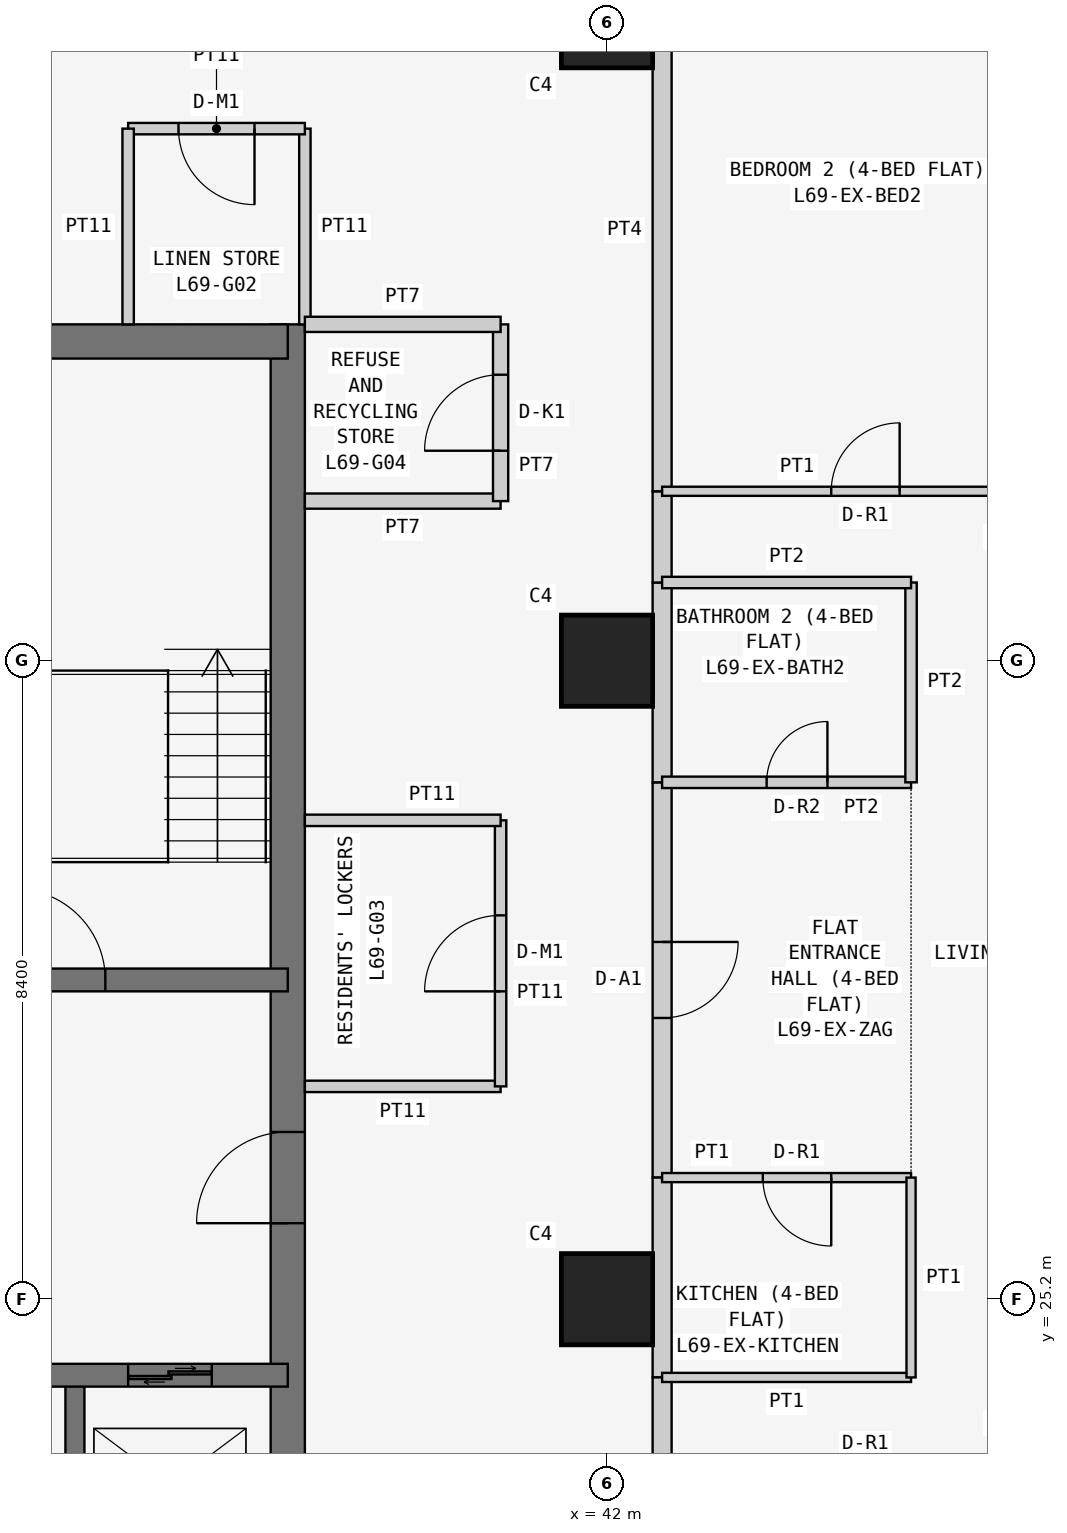
"""IFC4 building model, lengths in metres.
Left out: names, types, materials, properties, quantities, classifications, styles, units other than length and angle.
Written with IfcOpenShell. Run it as: python <this file> out.ifc"""

import sys

from ifc_helpers import new_model, si_unit, direction, frame, frame_2d, origin, origin_2d, place, context, subcontext, project, spatial, rectangle, extrude, element, fill, save


model = new_model("IFC4")
c1 = context("Model", 3, precision=1e-05, world=origin(), true_north=direction((0.0, 1.0)))
c2 = subcontext(c1, "Body", "Model", "MODEL_VIEW")
j1 = project(units=[si_unit("LENGTHUNIT", "METRE"), si_unit("PLANEANGLEUNIT", "RADIAN")], contexts=[c1])
p1 = place(None, origin())
s1 = spatial("IfcSite", under=j1, at=p1, CompositionType="ELEMENT")
p2 = place(p1, origin())
s2 = spatial("IfcBuilding", under=s1, at=p2, CompositionType="ELEMENT")
p3 = place(p2, frame((0.0, 0.0, 264.9)))
s3 = spatial("IfcBuildingStorey", under=s2, at=p3, CompositionType="ELEMENT", Elevation=264.9)
for number, where, z_axis, x_axis in (
    (1, (42.0, 25.2, 0.0), (0.0, 0.0, 1.0), (1.0, 0.0, 0.0)),
    (2, (42.0, 33.6, 0.0), (0.0, 0.0, 1.0), (1.0, 0.0, 0.0)),
    (3, (42.0, 42.0, 0.0), (0.0, 0.0, 1.0), (1.0, 0.0, 0.0)),
):
    element("IfcColumn", number, at=place(p3, frame(where, z_axis=z_axis, x_axis=x_axis)), inside=s3, PredefinedType="COLUMN", context=c2, shape_type="SweptSolid", body=[
        extrude(rectangle(XDim=1.2, YDim=1.2, at=origin_2d()), origin(), (0.0, 0.0, 1.0), 3.6),
    ])
p4 = place(p3, frame((37.8, 21.0, 0.0), z_axis=(0.0, 0.0, 1.0), x_axis=(0.0, 1.0, 0.0)))
e4 = element("IfcWall", 4, at=p4, inside=s3, PredefinedType="SHEAR", context=c2, shape_type="SweptSolid", body=[
    extrude(rectangle(XDim=17.025, YDim=0.45, at=frame_2d((8.512, 0.0))), origin(), (0.0, 0.0, 1.0), 3.6),
])
p5 = place(p4, frame((5.2, 0.0, 0.0)))
e5 = element("IfcOpeningElement", 5, at=p5, cuts=e4, PredefinedType="OPENING", context=c2, shape_type="SweptSolid", body=[
    extrude(rectangle(XDim=1.2, YDim=2.1, at=frame_2d((0.6, 1.05))), frame((0.0, 0.235, 0.0), z_axis=(0.0, -1.0, 0.0), x_axis=(1.0, 0.0, 0.0)), (0.0, 0.0, 1.0), 0.47),
])
p6 = place(p3, frame((37.8, 37.8, 0.0), z_axis=(0.0, 0.0, 1.0), x_axis=(-1.0, 0.0, 0.0)))
e6 = element("IfcWall", 6, at=p6, inside=s3, PredefinedType="SHEAR", context=c2, shape_type="SweptSolid", body=[
    extrude(rectangle(XDim=17.025, YDim=0.45, at=frame_2d((8.513, 0.0))), origin(), (0.0, 0.0, 1.0), 3.6),
])
p7 = place(p3, frame((26.6, 24.2, 0.0), z_axis=(0.0, 0.0, 1.0), x_axis=(1.0, 0.0, 0.0)))
e7 = element("IfcWall", 7, at=p7, inside=s3, PredefinedType="SHEAR", context=c2, shape_type="SweptSolid", body=[
    extrude(rectangle(XDim=11.2, YDim=0.3, at=frame_2d((5.6, 0.0))), origin(), (0.0, 0.0, 1.0), 3.6),
])
p8 = place(p7, frame((0.913, 0.0, 0.0)))
e8 = element("IfcOpeningElement", 8, at=p8, cuts=e7, PredefinedType="OPENING", context=c2, shape_type="SweptSolid", body=[
    extrude(rectangle(XDim=1.0, YDim=2.1, at=frame_2d((0.5, 1.05))), frame((0.0, 0.16, 0.0), z_axis=(0.0, -1.0, 0.0), x_axis=(1.0, 0.0, 0.0)), (0.0, 0.0, 1.0), 0.32),
])
p9 = place(p7, frame((3.7, 0.0, 0.0)))
e9 = element("IfcOpeningElement", 9, at=p9, cuts=e7, PredefinedType="OPENING", context=c2, shape_type="SweptSolid", body=[
    extrude(rectangle(XDim=1.0, YDim=2.1, at=frame_2d((0.5, 1.05))), frame((0.0, 0.16, 0.0), z_axis=(0.0, -1.0, 0.0), x_axis=(1.0, 0.0, 0.0)), (0.0, 0.0, 1.0), 0.32),
])
p10 = place(p7, frame((6.5, 0.0, 0.0)))
e10 = element("IfcOpeningElement", 10, at=p10, cuts=e7, PredefinedType="OPENING", context=c2, shape_type="SweptSolid", body=[
    extrude(rectangle(XDim=1.0, YDim=2.1, at=frame_2d((0.5, 1.05))), frame((0.0, 0.16, 0.0), z_axis=(0.0, -1.0, 0.0), x_axis=(1.0, 0.0, 0.0)), (0.0, 0.0, 1.0), 0.32),
])
p11 = place(p7, frame((9.1, 0.0, 0.0)))
e11 = element("IfcOpeningElement", 11, at=p11, cuts=e7, PredefinedType="OPENING", context=c2, shape_type="SweptSolid", body=[
    extrude(rectangle(XDim=1.1, YDim=2.1, at=frame_2d((0.55, 1.05))), frame((0.0, 0.16, 0.0), z_axis=(0.0, -1.0, 0.0), x_axis=(1.0, 0.0, 0.0)), (0.0, 0.0, 1.0), 0.32),
])
p12 = place(p3, frame((32.2, 29.4, 0.0), z_axis=(0.0, 0.0, 1.0), x_axis=(1.0, 0.0, 0.0)))
e12 = element("IfcWall", 12, at=p12, inside=s3, PredefinedType="SHEAR", context=c2, shape_type="SweptSolid", body=[
    extrude(rectangle(XDim=5.6, YDim=0.3, at=frame_2d((2.8, 0.0))), origin(), (0.0, 0.0, 1.0), 3.6),
])
p13 = place(p12, frame((2.0, 0.0, 0.0)))
e13 = element("IfcOpeningElement", 13, at=p13, cuts=e12, PredefinedType="OPENING", context=c2, shape_type="SweptSolid", body=[
    extrude(rectangle(XDim=1.2, YDim=2.1, at=frame_2d((0.6, 1.05))), frame((0.0, 0.16, 0.0), z_axis=(0.0, -1.0, 0.0), x_axis=(1.0, 0.0, 0.0)), (0.0, 0.0, 1.0), 0.32),
])
p14 = place(p3, frame((35.0, 21.0, 0.0), z_axis=(0.0, 0.0, 1.0), x_axis=(0.0, 1.0, 0.0)))
e14 = element("IfcWall", 14, at=p14, inside=s3, PredefinedType="SHEAR", context=c2, shape_type="SweptSolid", body=[
    extrude(rectangle(XDim=3.2, YDim=0.25, at=frame_2d((1.6, 0.0))), origin(), (0.0, 0.0, 1.0), 3.6),
])
p15 = place(p3, frame((38.025, 38.025, 0.0), z_axis=(0.0, 0.0, 1.0), x_axis=(0.0, 1.0, 0.0)))
e15 = element("IfcWall", 15, at=p15, inside=s3, PredefinedType="PARTITIONING", context=c2, shape_type="SweptSolid", body=[
    extrude(rectangle(XDim=2.575, YDim=0.15, at=frame_2d((1.288, 0.0))), origin(), (0.0, 0.0, 1.0), 3.45),
])
p16 = place(p3, frame((38.025, 40.6, 0.0), z_axis=(0.0, 0.0, 1.0), x_axis=(-1.0, 0.0, 0.0)))
e16 = element("IfcWall", 16, at=p16, inside=s3, PredefinedType="PARTITIONING", context=c2, shape_type="SweptSolid", body=[
    extrude(rectangle(XDim=2.325, YDim=0.15, at=frame_2d((1.163, 0.0))), origin(), (0.0, 0.0, 1.0), 3.45),
])
p17 = place(p16, frame((0.663, 0.0, 0.0)))
e17 = element("IfcOpeningElement", 17, at=p17, cuts=e16, PredefinedType="OPENING", context=c2, shape_type="SweptSolid", body=[
    extrude(rectangle(XDim=1.0, YDim=2.1, at=frame_2d((0.5, 1.05))), frame((0.0, 0.085, 0.0), z_axis=(0.0, -1.0, 0.0), x_axis=(1.0, 0.0, 0.0)), (0.0, 0.0, 1.0), 0.17),
])
for number, where, z_axis, x_axis in (
    (18, (35.7, 40.6, 0.0), (0.0, 0.0, 1.0), (0.0, -1.0, 0.0)),
    (19, (38.025, 28.0, 0.0), (0.0, 0.0, 1.0), (1.0, 0.0, 0.0)),
):
    element("IfcWall", number, at=place(p3, frame(where, z_axis=z_axis, x_axis=x_axis)), inside=s3, PredefinedType="PARTITIONING", context=c2, shape_type="SweptSolid", body=[
        extrude(rectangle(XDim=2.575, YDim=0.15, at=frame_2d((1.288, 0.0))), origin(), (0.0, 0.0, 1.0), 3.45),
    ])
p18 = place(p3, frame((40.6, 28.0, 0.0), z_axis=(0.0, 0.0, 1.0), x_axis=(0.0, 1.0, 0.0)))
e20 = element("IfcWall", 20, at=p18, inside=s3, PredefinedType="PARTITIONING", context=c2, shape_type="SweptSolid", body=[
    extrude(rectangle(XDim=3.5, YDim=0.15, at=frame_2d((1.75, 0.0))), origin(), (0.0, 0.0, 1.0), 3.45),
])
p19 = place(p18, frame((1.25, 0.0, 0.0)))
e21 = element("IfcOpeningElement", 21, at=p19, cuts=e20, PredefinedType="OPENING", context=c2, shape_type="SweptSolid", body=[
    extrude(rectangle(XDim=1.0, YDim=2.1, at=frame_2d((0.5, 1.05))), frame((0.0, 0.085, 0.0), z_axis=(0.0, -1.0, 0.0), x_axis=(1.0, 0.0, 0.0)), (0.0, 0.0, 1.0), 0.17),
])
p20 = place(p3, frame((40.6, 31.5, 0.0), z_axis=(0.0, 0.0, 1.0), x_axis=(-1.0, 0.0, 0.0)))
e22 = element("IfcWall", 22, at=p20, inside=s3, PredefinedType="PARTITIONING", context=c2, shape_type="SweptSolid", body=[
    extrude(rectangle(XDim=2.575, YDim=0.15, at=frame_2d((1.288, 0.0))), origin(), (0.0, 0.0, 1.0), 3.45),
])
p21 = place(p3, frame((38.025, 35.7, 0.0), z_axis=(0.0, 0.0, 1.0), x_axis=(1.0, 0.0, 0.0)))
e23 = element("IfcWall", 23, at=p21, inside=s3, PredefinedType="PARTITIONING", context=c2, shape_type="SweptSolid", body=[
    extrude(rectangle(XDim=2.575, YDim=0.2, at=frame_2d((1.288, 0.0))), origin(), (0.0, 0.0, 1.0), 3.45),
])
p22 = place(p3, frame((40.6, 35.7, 0.0), z_axis=(0.0, 0.0, 1.0), x_axis=(0.0, 1.0, 0.0)))
e24 = element("IfcWall", 24, at=p22, inside=s3, PredefinedType="PARTITIONING", context=c2, shape_type="SweptSolid", body=[
    extrude(rectangle(XDim=2.325, YDim=0.2, at=frame_2d((1.163, 0.0))), origin(), (0.0, 0.0, 1.0), 3.45),
])
p23 = place(p22, frame((0.663, 0.0, 0.0)))
e25 = element("IfcOpeningElement", 25, at=p23, cuts=e24, PredefinedType="OPENING", context=c2, shape_type="SweptSolid", body=[
    extrude(rectangle(XDim=1.0, YDim=2.1, at=frame_2d((0.5, 1.05))), frame((0.0, 0.11, 0.0), z_axis=(0.0, -1.0, 0.0), x_axis=(1.0, 0.0, 0.0)), (0.0, 0.0, 1.0), 0.22),
])
p24 = place(p3, frame((40.6, 38.025, 0.0), z_axis=(0.0, 0.0, 1.0), x_axis=(-1.0, 0.0, 0.0)))
e26 = element("IfcWall", 26, at=p24, inside=s3, PredefinedType="PARTITIONING", context=c2, shape_type="SweptSolid", body=[
    extrude(rectangle(XDim=2.575, YDim=0.2, at=frame_2d((1.288, 0.0))), origin(), (0.0, 0.0, 1.0), 3.45),
])
p25 = place(p3, frame((42.725, 32.0, 0.0), z_axis=(0.0, 0.0, 1.0), x_axis=(0.0, -1.0, 0.0)))
e27 = element("IfcWall", 27, at=p25, inside=s3, PredefinedType="PARTITIONING", context=c2, shape_type="SweptSolid", body=[
    extrude(rectangle(XDim=5.2, YDim=0.25, at=frame_2d((2.6, 0.0))), origin(), (0.0, 0.0, 1.0), 3.45),
])
p26 = place(p25, frame((2.1, 0.0, 0.0)))
e28 = element("IfcOpeningElement", 28, at=p26, cuts=e27, PredefinedType="OPENING", context=c2, shape_type="SweptSolid", body=[
    extrude(rectangle(XDim=1.0, YDim=2.1, at=frame_2d((0.5, 1.05))), frame((0.0, 0.135, 0.0), z_axis=(0.0, -1.0, 0.0), x_axis=(1.0, 0.0, 0.0)), (0.0, 0.0, 1.0), 0.27),
])
p27 = place(p3, frame((42.725, 34.629, 0.0), z_axis=(0.0, 0.0, 1.0), x_axis=(0.0, -1.0, 0.0)))
e29 = element("IfcWall", 29, at=p27, inside=s3, PredefinedType="PARTITIONING", context=c2, shape_type="SweptSolid", body=[
    extrude(rectangle(XDim=2.629, YDim=0.25, at=frame_2d((1.314, 0.0))), origin(), (0.0, 0.0, 1.0), 3.45),
])
p28 = place(p3, frame((42.725, 26.8, 0.0), z_axis=(0.0, 0.0, 1.0), x_axis=(0.0, -1.0, 0.0)))
e30 = element("IfcWall", 30, at=p28, inside=s3, PredefinedType="PARTITIONING", context=c2, shape_type="SweptSolid", body=[
    extrude(rectangle(XDim=2.629, YDim=0.25, at=frame_2d((1.314, 0.0))), origin(), (0.0, 0.0, 1.0), 3.45),
])
p29 = place(p3, frame((42.725, 24.171, 0.0), z_axis=(0.0, 0.0, 1.0), x_axis=(0.0, -1.0, 0.0)))
e31 = element("IfcWall", 31, at=p29, inside=s3, PredefinedType="PARTITIONING", context=c2, shape_type="SweptSolid", body=[
    extrude(rectangle(XDim=1.2, YDim=0.25, at=frame_2d((0.6, 0.0))), origin(), (0.0, 0.0, 1.0), 3.45),
])
p30 = place(p3, frame((42.725, 35.829, 0.0), z_axis=(0.0, 0.0, 1.0), x_axis=(0.0, -1.0, 0.0)))
e32 = element("IfcWall", 32, at=p30, inside=s3, PredefinedType="PARTITIONING", context=c2, shape_type="SweptSolid", body=[
    extrude(rectangle(XDim=1.2, YDim=0.25, at=frame_2d((0.6, 0.0))), origin(), (0.0, 0.0, 1.0), 3.45),
])
p31 = place(p3, frame((42.725, 42.7, 0.0), z_axis=(0.0, 0.0, 1.0), x_axis=(0.0, -1.0, 0.0)))
e33 = element("IfcWall", 33, at=p31, inside=s3, PredefinedType="PARTITIONING", context=c2, shape_type="SweptSolid", body=[
    extrude(rectangle(XDim=6.871, YDim=0.25, at=frame_2d((3.436, 0.0))), origin(), (0.0, 0.0, 1.0), 3.45),
])
p32 = place(p3, frame((46.0, 32.0, 0.0), z_axis=(0.0, 0.0, 1.0), x_axis=(-1.0, 0.0, 0.0)))
e34 = element("IfcWall", 34, at=p32, inside=s3, PredefinedType="PARTITIONING", context=c2, shape_type="SweptSolid", body=[
    extrude(rectangle(XDim=3.275, YDim=0.15, at=frame_2d((1.637, 0.0))), origin(), (0.0, 0.0, 1.0), 3.45),
])
p33 = place(p32, frame((1.1, 0.0, 0.0)))
e35 = element("IfcOpeningElement", 35, at=p33, cuts=e34, PredefinedType="OPENING", context=c2, shape_type="SweptSolid", body=[
    extrude(rectangle(XDim=0.8, YDim=2.1, at=frame_2d((0.4, 1.05))), frame((0.0, 0.085, 0.0), z_axis=(0.0, -1.0, 0.0), x_axis=(1.0, 0.0, 0.0)), (0.0, 0.0, 1.0), 0.17),
])
p34 = place(p3, frame((42.725, 26.8, 0.0), z_axis=(0.0, 0.0, 1.0), x_axis=(1.0, 0.0, 0.0)))
e36 = element("IfcWall", 36, at=p34, inside=s3, PredefinedType="PARTITIONING", context=c2, shape_type="SweptSolid", body=[
    extrude(rectangle(XDim=3.275, YDim=0.12, at=frame_2d((1.637, 0.0))), origin(), (0.0, 0.0, 1.0), 3.45),
])
p35 = place(p34, frame((1.325, 0.0, 0.0)))
e37 = element("IfcOpeningElement", 37, at=p35, cuts=e36, PredefinedType="OPENING", context=c2, shape_type="SweptSolid", body=[
    extrude(rectangle(XDim=0.9, YDim=2.1, at=frame_2d((0.45, 1.05))), frame((0.0, 0.07, 0.0), z_axis=(0.0, -1.0, 0.0), x_axis=(1.0, 0.0, 0.0)), (0.0, 0.0, 1.0), 0.14),
])
p36 = place(p3, frame((46.0, 32.0, 0.0), z_axis=(0.0, 0.0, 1.0), x_axis=(0.0, 1.0, 0.0)))
e38 = element("IfcWall", 38, at=p36, inside=s3, PredefinedType="PARTITIONING", context=c2, shape_type="SweptSolid", body=[
    extrude(rectangle(XDim=2.629, YDim=0.15, at=frame_2d((1.314, 0.0))), origin(), (0.0, 0.0, 1.0), 3.45),
])
p37 = place(p3, frame((46.0, 34.629, 0.0), z_axis=(0.0, 0.0, 1.0), x_axis=(-1.0, 0.0, 0.0)))
e39 = element("IfcWall", 39, at=p37, inside=s3, PredefinedType="PARTITIONING", context=c2, shape_type="SweptSolid", body=[
    extrude(rectangle(XDim=3.275, YDim=0.15, at=frame_2d((1.637, 0.0))), origin(), (0.0, 0.0, 1.0), 3.45),
])
p38 = place(p3, frame((42.725, 24.171, 0.0), z_axis=(0.0, 0.0, 1.0), x_axis=(1.0, 0.0, 0.0)))
e40 = element("IfcWall", 40, at=p38, inside=s3, PredefinedType="PARTITIONING", context=c2, shape_type="SweptSolid", body=[
    extrude(rectangle(XDim=3.275, YDim=0.12, at=frame_2d((1.637, 0.0))), origin(), (0.0, 0.0, 1.0), 3.45),
])
p39 = place(p3, frame((46.0, 24.171, 0.0), z_axis=(0.0, 0.0, 1.0), x_axis=(0.0, 1.0, 0.0)))
e41 = element("IfcWall", 41, at=p39, inside=s3, PredefinedType="PARTITIONING", context=c2, shape_type="SweptSolid", body=[
    extrude(rectangle(XDim=2.629, YDim=0.12, at=frame_2d((1.314, 0.0))), origin(), (0.0, 0.0, 1.0), 3.45),
])
p40 = place(p3, frame((42.725, 35.829, 0.0), z_axis=(0.0, 0.0, 1.0), x_axis=(1.0, 0.0, 0.0)))
e42 = element("IfcWall", 42, at=p40, inside=s3, PredefinedType="PARTITIONING", context=c2, shape_type="SweptSolid", body=[
    extrude(rectangle(XDim=5.075, YDim=0.12, at=frame_2d((2.538, 0.0))), origin(), (0.0, 0.0, 1.0), 3.45),
])
p41 = place(p40, frame((2.225, 0.0, 0.0)))
e43 = element("IfcOpeningElement", 43, at=p41, cuts=e42, PredefinedType="OPENING", context=c2, shape_type="SweptSolid", body=[
    extrude(rectangle(XDim=0.9, YDim=2.1, at=frame_2d((0.45, 1.05))), frame((0.0, 0.07, 0.0), z_axis=(0.0, -1.0, 0.0), x_axis=(1.0, 0.0, 0.0)), (0.0, 0.0, 1.0), 0.14),
])
p42 = place(p17, origin())
e44 = element("IfcDoor", 44, at=p42, inside=s3, OperationType="SINGLE_SWING_LEFT", PredefinedType="DOOR", context=c2, shape_type="SweptSolid", body=[
    extrude(rectangle(XDim=1.0, YDim=2.1, at=frame_2d((0.5, 1.05))), frame((0.0, 0.025, 0.0), z_axis=(0.0, -1.0, 0.0), x_axis=(1.0, 0.0, 0.0)), (0.0, 0.0, 1.0), 0.05),
])
fill(e17, e44)
p43 = place(p19, origin())
e45 = element("IfcDoor", 45, at=p43, inside=s3, OperationType="SINGLE_SWING_LEFT", PredefinedType="DOOR", context=c2, shape_type="SweptSolid", body=[
    extrude(rectangle(XDim=1.0, YDim=2.1, at=frame_2d((0.5, 1.05))), frame((0.0, 0.025, 0.0), z_axis=(0.0, -1.0, 0.0), x_axis=(1.0, 0.0, 0.0)), (0.0, 0.0, 1.0), 0.05),
])
fill(e21, e45)
p44 = place(p23, origin())
e46 = element("IfcDoor", 46, at=p44, inside=s3, OperationType="SINGLE_SWING_LEFT", PredefinedType="DOOR", context=c2, shape_type="SweptSolid", body=[
    extrude(rectangle(XDim=1.0, YDim=2.1, at=frame_2d((0.5, 1.05))), frame((0.0, 0.025, 0.0), z_axis=(0.0, -1.0, 0.0), x_axis=(1.0, 0.0, 0.0)), (0.0, 0.0, 1.0), 0.05),
])
fill(e25, e46)
p45 = place(p26, origin())
e47 = element("IfcDoor", 47, at=p45, inside=s3, OperationType="SINGLE_SWING_LEFT", PredefinedType="DOOR", context=c2, shape_type="SweptSolid", body=[
    extrude(rectangle(XDim=1.0, YDim=2.1, at=frame_2d((0.5, 1.05))), frame((0.0, 0.025, 0.0), z_axis=(0.0, -1.0, 0.0), x_axis=(1.0, 0.0, 0.0)), (0.0, 0.0, 1.0), 0.05),
])
fill(e28, e47)
p46 = place(p33, frame((0.8, 0.0, 0.0), z_axis=(0.0, 0.0, 1.0), x_axis=(-1.0, 0.0, 0.0)))
e48 = element("IfcDoor", 48, at=p46, inside=s3, OperationType="SINGLE_SWING_RIGHT", PredefinedType="DOOR", context=c2, shape_type="SweptSolid", body=[
    extrude(rectangle(XDim=0.8, YDim=2.1, at=frame_2d((0.4, 1.05))), frame((0.0, 0.025, 0.0), z_axis=(0.0, -1.0, 0.0), x_axis=(1.0, 0.0, 0.0)), (0.0, 0.0, 1.0), 0.05),
])
fill(e35, e48)
p47 = place(p35, frame((0.9, 0.0, 0.0), z_axis=(0.0, 0.0, 1.0), x_axis=(-1.0, 0.0, 0.0)))
e49 = element("IfcDoor", 49, at=p47, inside=s3, OperationType="SINGLE_SWING_LEFT", PredefinedType="DOOR", context=c2, shape_type="SweptSolid", body=[
    extrude(rectangle(XDim=0.9, YDim=2.1, at=frame_2d((0.45, 1.05))), frame((0.0, 0.025, 0.0), z_axis=(0.0, -1.0, 0.0), x_axis=(1.0, 0.0, 0.0)), (0.0, 0.0, 1.0), 0.05),
])
fill(e37, e49)
p48 = place(p41, origin())
e50 = element("IfcDoor", 50, at=p48, inside=s3, OperationType="SINGLE_SWING_RIGHT", PredefinedType="DOOR", context=c2, shape_type="SweptSolid", body=[
    extrude(rectangle(XDim=0.9, YDim=2.1, at=frame_2d((0.45, 1.05))), frame((0.0, 0.025, 0.0), z_axis=(0.0, -1.0, 0.0), x_axis=(1.0, 0.0, 0.0)), (0.0, 0.0, 1.0), 0.05),
])
fill(e43, e50)
p49 = place(p5, origin())
e51 = element("IfcDoor", 51, at=p49, inside=s3, OperationType="SINGLE_SWING_LEFT", PredefinedType="DOOR", context=c2, shape_type="SweptSolid", body=[
    extrude(rectangle(XDim=1.2, YDim=2.1, at=frame_2d((0.6, 1.05))), frame((0.0, 0.025, 0.0), z_axis=(0.0, -1.0, 0.0), x_axis=(1.0, 0.0, 0.0)), (0.0, 0.0, 1.0), 0.05),
])
fill(e5, e51)
p50 = place(p13, origin())
e52 = element("IfcDoor", 52, at=p50, inside=s3, OperationType="SINGLE_SWING_LEFT", PredefinedType="DOOR", context=c2, shape_type="SweptSolid", body=[
    extrude(rectangle(XDim=1.2, YDim=2.1, at=frame_2d((0.6, 1.05))), frame((0.0, 0.025, 0.0), z_axis=(0.0, -1.0, 0.0), x_axis=(1.0, 0.0, 0.0)), (0.0, 0.0, 1.0), 0.05),
])
fill(e13, e52)
p51 = place(p11, origin())
e53 = element("IfcDoor", 53, at=p51, inside=s3, OperationType="DOUBLE_DOOR_SLIDING", PredefinedType="DOOR", context=c2, shape_type="SweptSolid", body=[
    extrude(rectangle(XDim=1.1, YDim=2.1, at=frame_2d((0.55, 1.05))), frame((0.0, 0.025, 0.0), z_axis=(0.0, -1.0, 0.0), x_axis=(1.0, 0.0, 0.0)), (0.0, 0.0, 1.0), 0.05),
])
fill(e11, e53)
save(model, sys.argv[1])
